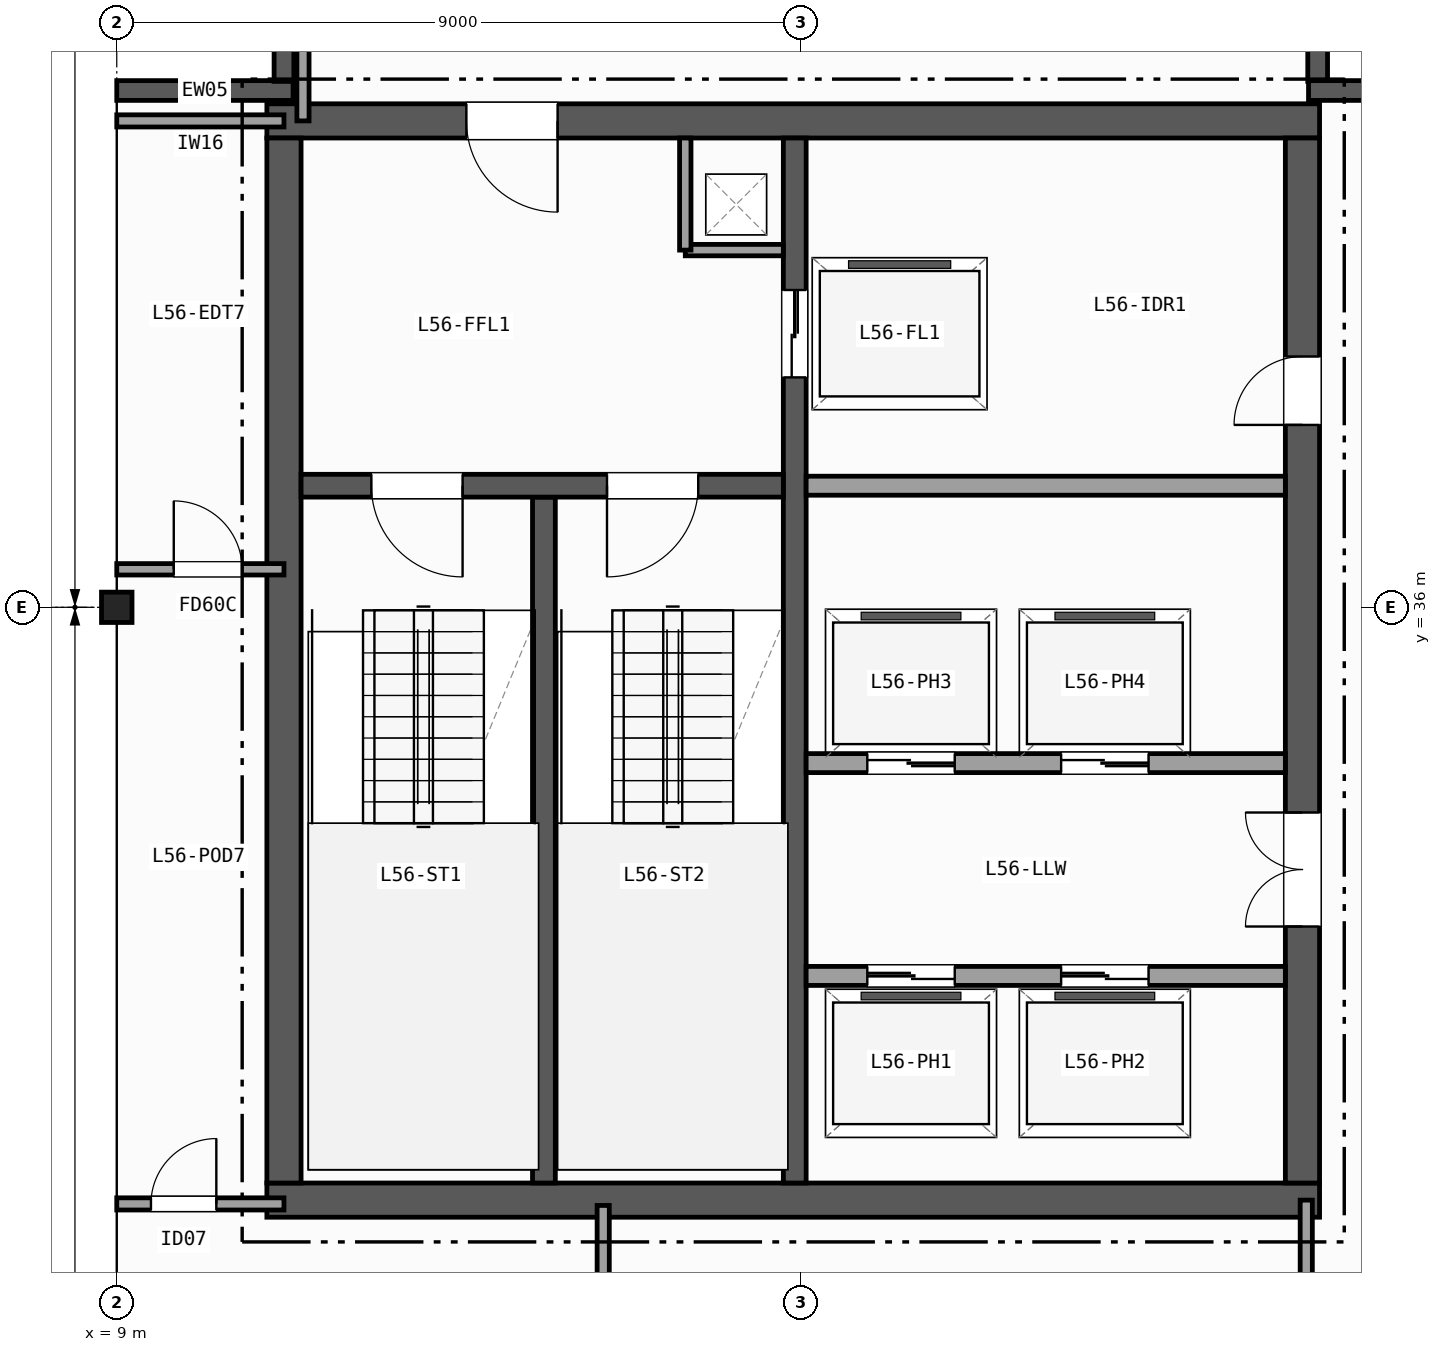
"""IFC4 building model, lengths in metres.
Left out: names, types, materials, properties, quantities, classifications, styles, units other than length and angle.
Written with IfcOpenShell. Run it as: python <this file> out.ifc"""

import sys

from ifc_helpers import new_model, si_unit, direction, frame, frame_2d, origin, origin_2d, place, context, subcontext, project, spatial, rectangle, i_section, extrude, element, fill, save


model = new_model("IFC4")
c1 = context("Model", 3, precision=1e-05, world=origin(), true_north=direction((0.0, 1.0)))
c2 = subcontext(c1, "Body", "Model", "MODEL_VIEW")
j1 = project(units=[si_unit("LENGTHUNIT", "METRE"), si_unit("PLANEANGLEUNIT", "RADIAN")], contexts=[c1])
p1 = place(None, origin())
s1 = spatial("IfcSite", under=j1, at=p1, CompositionType="ELEMENT")
p2 = place(p1, origin())
s2 = spatial("IfcBuilding", under=s1, at=p2, CompositionType="ELEMENT")
p3 = place(p2, frame((0.0, 0.0, 224.7)))
s3 = spatial("IfcBuildingStorey", under=s2, at=p3, CompositionType="ELEMENT", Elevation=224.7)
p4 = place(p3, frame((9.0, 36.0, 0.0), z_axis=(0.0, 0.0, 1.0), x_axis=(1.0, 0.0, 0.0)))
e1 = element("IfcColumn", 1, at=p4, inside=s3, PredefinedType="COLUMN", context=c2, shape_type="SweptSolid", body=[
    extrude(i_section(OverallWidth=0.401, OverallDepth=0.399, WebThickness=0.025, FlangeThickness=0.04, FilletRadius=0.015, at=origin_2d()), origin(), (0.0, 0.0, 1.0), 3.7),
])
p5 = place(p3, frame((9.0, 42.8, 0.0), z_axis=(0.0, 0.0, 1.0), x_axis=(1.0, 0.0, 0.0)))
e2 = element("IfcWall", 2, at=p5, inside=s3, PredefinedType="SOLIDWALL", context=c2, shape_type="SweptSolid", body=[
    extrude(rectangle(XDim=2.32, YDim=0.26, at=frame_2d((1.16, 0.0))), origin(), (0.0, 0.0, 1.0), 3.42),
])
for number, where, z_axis, x_axis in (
    (3, (11.2, 42.92, 0.0), (0.0, 0.0, 1.0), (0.0, 1.0, 0.0)),
    (4, (24.8, 45.0, 0.0), (0.0, 0.0, 1.0), (0.0, -1.0, 0.0)),
):
    element("IfcWall", number, at=place(p3, frame(where, z_axis=z_axis, x_axis=x_axis)), inside=s3, PredefinedType="SOLIDWALL", context=c2, shape_type="SweptSolid", body=[
        extrude(rectangle(XDim=2.08, YDim=0.26, at=frame_2d((1.04, 0.0))), origin(), (0.0, 0.0, 1.0), 3.42),
    ])
p6 = place(p3, frame((24.68, 42.8, 0.0), z_axis=(0.0, 0.0, 1.0), x_axis=(1.0, 0.0, 0.0)))
e5 = element("IfcWall", 5, at=p6, inside=s3, PredefinedType="SOLIDWALL", context=c2, shape_type="SweptSolid", body=[
    extrude(rectangle(XDim=2.32, YDim=0.26, at=frame_2d((1.16, 0.0))), origin(), (0.0, 0.0, 1.0), 3.42),
])
p7 = place(p3, frame((10.975, 28.2, 0.0), z_axis=(0.0, 0.0, 1.0), x_axis=(1.0, 0.0, 0.0)))
e6 = element("IfcWall", 6, at=p7, inside=s3, PredefinedType="SHEAR", context=c2, shape_type="SweptSolid", body=[
    extrude(rectangle(XDim=13.85, YDim=0.45, at=frame_2d((6.925, 0.0))), origin(), (0.0, 0.0, 1.0), 3.42),
])
p8 = place(p3, frame((24.825, 42.4, 0.0), z_axis=(0.0, 0.0, 1.0), x_axis=(-1.0, 0.0, 0.0)))
e7 = element("IfcWall", 7, at=p8, inside=s3, PredefinedType="SHEAR", context=c2, shape_type="SweptSolid", body=[
    extrude(rectangle(XDim=13.85, YDim=0.45, at=frame_2d((6.925, 0.0))), origin(), (0.0, 0.0, 1.0), 3.42),
])
p9 = place(p8, frame((10.025, 0.0, 0.0)))
e8 = element("IfcOpeningElement", 8, at=p9, cuts=e7, PredefinedType="OPENING", context=c2, shape_type="SweptSolid", body=[
    extrude(rectangle(XDim=1.2, YDim=2.15, at=frame_2d((0.6, 1.075))), frame((0.0, 0.235, 0.0), z_axis=(0.0, -1.0, 0.0), x_axis=(1.0, 0.0, 0.0)), (0.0, 0.0, 1.0), 0.47),
])
p10 = place(p3, frame((11.2, 42.175, 0.0), z_axis=(0.0, 0.0, 1.0), x_axis=(0.0, -1.0, 0.0)))
e9 = element("IfcWall", 9, at=p10, inside=s3, PredefinedType="SHEAR", context=c2, shape_type="SweptSolid", body=[
    extrude(rectangle(XDim=13.75, YDim=0.45, at=frame_2d((6.875, 0.0))), origin(), (0.0, 0.0, 1.0), 3.42),
])
p11 = place(p3, frame((24.6, 28.425, 0.0), z_axis=(0.0, 0.0, 1.0), x_axis=(0.0, 1.0, 0.0)))
e10 = element("IfcWall", 10, at=p11, inside=s3, PredefinedType="SHEAR", context=c2, shape_type="SweptSolid", body=[
    extrude(rectangle(XDim=13.75, YDim=0.45, at=frame_2d((6.875, 0.0))), origin(), (0.0, 0.0, 1.0), 3.42),
])
p12 = place(p11, frame((3.375, 0.0, 0.0)))
e11 = element("IfcOpeningElement", 11, at=p12, cuts=e10, PredefinedType="OPENING", context=c2, shape_type="SweptSolid", body=[
    extrude(rectangle(XDim=1.5, YDim=2.2, at=frame_2d((0.75, 1.1))), frame((0.0, 0.235, 0.0), z_axis=(0.0, -1.0, 0.0), x_axis=(1.0, 0.0, 0.0)), (0.0, 0.0, 1.0), 0.47),
])
p13 = place(p11, frame((9.975, 0.0, 0.0)))
e12 = element("IfcOpeningElement", 12, at=p13, cuts=e10, PredefinedType="OPENING", context=c2, shape_type="SweptSolid", body=[
    extrude(rectangle(XDim=0.9, YDim=2.1, at=frame_2d((0.45, 1.05))), frame((0.0, 0.235, 0.0), z_axis=(0.0, -1.0, 0.0), x_axis=(1.0, 0.0, 0.0)), (0.0, 0.0, 1.0), 0.47),
])
p14 = place(p3, frame((14.62, 28.425, 0.0), z_axis=(0.0, 0.0, 1.0), x_axis=(0.0, 1.0, 0.0)))
e13 = element("IfcWall", 13, at=p14, inside=s3, PredefinedType="SHEAR", context=c2, shape_type="SweptSolid", body=[
    extrude(rectangle(XDim=9.025, YDim=0.3, at=frame_2d((4.512, 0.0))), origin(), (0.0, 0.0, 1.0), 3.42),
])
p15 = place(p3, frame((17.92, 42.175, 0.0), z_axis=(0.0, 0.0, 1.0), x_axis=(0.0, -1.0, 0.0)))
e14 = element("IfcWall", 14, at=p15, inside=s3, PredefinedType="SHEAR", context=c2, shape_type="SweptSolid", body=[
    extrude(rectangle(XDim=13.75, YDim=0.3, at=frame_2d((6.875, 0.0))), origin(), (0.0, 0.0, 1.0), 3.42),
])
p16 = place(p15, frame((2.0, 0.0, 0.0)))
e15 = element("IfcOpeningElement", 15, at=p16, cuts=e14, PredefinedType="OPENING", context=c2, shape_type="SweptSolid", body=[
    extrude(rectangle(XDim=1.15, YDim=2.15, at=frame_2d((0.575, 1.075))), frame((0.0, 0.16, 0.0), z_axis=(0.0, -1.0, 0.0), x_axis=(1.0, 0.0, 0.0)), (0.0, 0.0, 1.0), 0.32),
])
p17 = place(p3, frame((17.77, 37.6, 0.0), z_axis=(0.0, 0.0, 1.0), x_axis=(-1.0, 0.0, 0.0)))
e16 = element("IfcWall", 16, at=p17, inside=s3, PredefinedType="SHEAR", context=c2, shape_type="SweptSolid", body=[
    extrude(rectangle(XDim=6.345, YDim=0.3, at=frame_2d((3.172, 0.0))), origin(), (0.0, 0.0, 1.0), 3.42),
])
p18 = place(p17, frame((4.22, 0.0, 0.0)))
e17 = element("IfcOpeningElement", 17, at=p18, cuts=e16, PredefinedType="OPENING", context=c2, shape_type="SweptSolid", body=[
    extrude(rectangle(XDim=1.2, YDim=2.15, at=frame_2d((0.6, 1.075))), frame((0.0, 0.16, 0.0), z_axis=(0.0, -1.0, 0.0), x_axis=(1.0, 0.0, 0.0)), (0.0, 0.0, 1.0), 0.32),
])
p19 = place(p17, frame((1.12, 0.0, 0.0)))
e18 = element("IfcOpeningElement", 18, at=p19, cuts=e16, PredefinedType="OPENING", context=c2, shape_type="SweptSolid", body=[
    extrude(rectangle(XDim=1.2, YDim=2.15, at=frame_2d((0.6, 1.075))), frame((0.0, 0.16, 0.0), z_axis=(0.0, -1.0, 0.0), x_axis=(1.0, 0.0, 0.0)), (0.0, 0.0, 1.0), 0.32),
])
p20 = place(p3, frame((16.48, 40.7, 0.0), z_axis=(0.0, 0.0, 1.0), x_axis=(1.0, 0.0, 0.0)))
e19 = element("IfcWall", 19, at=p20, inside=s3, PredefinedType="PARTITIONING", context=c2, shape_type="SweptSolid", body=[
    extrude(rectangle(XDim=1.29, YDim=0.15, at=frame_2d((0.645, 0.0))), origin(), (0.0, 0.0, 1.0), 3.42),
])
p21 = place(p3, frame((16.48, 40.7, 0.0), z_axis=(0.0, 0.0, 1.0), x_axis=(0.0, 1.0, 0.0)))
e20 = element("IfcWall", 20, at=p21, inside=s3, PredefinedType="PARTITIONING", context=c2, shape_type="SweptSolid", body=[
    extrude(rectangle(XDim=1.475, YDim=0.15, at=frame_2d((0.738, 0.0))), origin(), (0.0, 0.0, 1.0), 3.42),
])
p22 = place(p3, frame((18.07, 37.6, 0.0), z_axis=(0.0, 0.0, 1.0), x_axis=(1.0, 0.0, 0.0)))
e21 = element("IfcWall", 21, at=p22, inside=s3, PredefinedType="PARTITIONING", context=c2, shape_type="SweptSolid", body=[
    extrude(rectangle(XDim=6.305, YDim=0.25, at=frame_2d((3.152, 0.0))), origin(), (0.0, 0.0, 1.0), 3.42),
])
p23 = place(p3, frame((18.07, 31.15, 0.0), z_axis=(0.0, 0.0, 1.0), x_axis=(1.0, 0.0, 0.0)))
e22 = element("IfcWall", 22, at=p23, inside=s3, PredefinedType="PARTITIONING", context=c2, shape_type="SweptSolid", body=[
    extrude(rectangle(XDim=6.305, YDim=0.25, at=frame_2d((3.152, 0.0))), origin(), (0.0, 0.0, 1.0), 3.42),
])
p24 = place(p23, frame((0.805, 0.0, 0.0)))
e23 = element("IfcOpeningElement", 23, at=p24, cuts=e22, PredefinedType="OPENING", context=c2, shape_type="SweptSolid", body=[
    extrude(rectangle(XDim=1.15, YDim=2.15, at=frame_2d((0.575, 1.075))), frame((0.0, 0.135, 0.0), z_axis=(0.0, -1.0, 0.0), x_axis=(1.0, 0.0, 0.0)), (0.0, 0.0, 1.0), 0.27),
])
p25 = place(p23, frame((3.355, 0.0, 0.0)))
e24 = element("IfcOpeningElement", 24, at=p25, cuts=e22, PredefinedType="OPENING", context=c2, shape_type="SweptSolid", body=[
    extrude(rectangle(XDim=1.15, YDim=2.15, at=frame_2d((0.575, 1.075))), frame((0.0, 0.135, 0.0), z_axis=(0.0, -1.0, 0.0), x_axis=(1.0, 0.0, 0.0)), (0.0, 0.0, 1.0), 0.27),
])
p26 = place(p3, frame((24.375, 33.95, 0.0), z_axis=(0.0, 0.0, 1.0), x_axis=(-1.0, 0.0, 0.0)))
e25 = element("IfcWall", 25, at=p26, inside=s3, PredefinedType="PARTITIONING", context=c2, shape_type="SweptSolid", body=[
    extrude(rectangle(XDim=6.305, YDim=0.25, at=frame_2d((3.152, 0.0))), origin(), (0.0, 0.0, 1.0), 3.42),
])
p27 = place(p26, frame((4.35, 0.0, 0.0)))
e26 = element("IfcOpeningElement", 26, at=p27, cuts=e25, PredefinedType="OPENING", context=c2, shape_type="SweptSolid", body=[
    extrude(rectangle(XDim=1.15, YDim=2.15, at=frame_2d((0.575, 1.075))), frame((0.0, 0.135, 0.0), z_axis=(0.0, -1.0, 0.0), x_axis=(1.0, 0.0, 0.0)), (0.0, 0.0, 1.0), 0.27),
])
p28 = place(p26, frame((1.8, 0.0, 0.0)))
e27 = element("IfcOpeningElement", 27, at=p28, cuts=e25, PredefinedType="OPENING", context=c2, shape_type="SweptSolid", body=[
    extrude(rectangle(XDim=1.15, YDim=2.15, at=frame_2d((0.575, 1.075))), frame((0.0, 0.135, 0.0), z_axis=(0.0, -1.0, 0.0), x_axis=(1.0, 0.0, 0.0)), (0.0, 0.0, 1.0), 0.27),
])
p29 = place(p3, frame((9.0, 28.15, 0.0), z_axis=(0.0, 0.0, 1.0), x_axis=(1.0, 0.0, 0.0)))
e28 = element("IfcWall", 28, at=p29, inside=s3, PredefinedType="PARTITIONING", context=c2, shape_type="SweptSolid", body=[
    extrude(rectangle(XDim=2.2, YDim=0.16, at=frame_2d((1.1, 0.0))), origin(), (0.0, 0.0, 1.0), 2.707),
])
p30 = place(p29, frame((0.45, 0.0, 0.0)))
e29 = element("IfcOpeningElement", 29, at=p30, cuts=e28, PredefinedType="OPENING", context=c2, shape_type="SweptSolid", body=[
    extrude(rectangle(XDim=0.86, YDim=2.05, at=frame_2d((0.43, 1.025))), frame((0.0, 0.09, 0.0), z_axis=(0.0, -1.0, 0.0), x_axis=(1.0, 0.0, 0.0)), (0.0, 0.0, 1.0), 0.18),
])
p31 = place(p3, frame((9.0, 42.4, 0.0), z_axis=(0.0, 0.0, 1.0), x_axis=(1.0, 0.0, 0.0)))
e30 = element("IfcWall", 30, at=p31, inside=s3, PredefinedType="PARTITIONING", context=c2, shape_type="SweptSolid", body=[
    extrude(rectangle(XDim=2.2, YDim=0.16, at=frame_2d((1.1, 0.0))), origin(), (0.0, 0.0, 1.0), 3.42),
])
p32 = place(p3, frame((11.45, 42.4, 0.0), z_axis=(0.0, 0.0, 1.0), x_axis=(0.0, 1.0, 0.0)))
e31 = element("IfcWall", 31, at=p32, inside=s3, PredefinedType="PARTITIONING", context=c2, shape_type="SweptSolid", body=[
    extrude(rectangle(XDim=2.666, YDim=0.16, at=frame_2d((1.333, 0.0))), origin(), (0.0, 0.0, 1.0), 3.42),
])
p33 = place(p3, frame((9.0, 36.5, 0.0), z_axis=(0.0, 0.0, 1.0), x_axis=(1.0, 0.0, 0.0)))
e32 = element("IfcWall", 32, at=p33, inside=s3, PredefinedType="PARTITIONING", context=c2, shape_type="SweptSolid", body=[
    extrude(rectangle(XDim=2.2, YDim=0.15, at=frame_2d((1.1, 0.0))), origin(), (0.0, 0.0, 1.0), 3.42),
])
p34 = place(p33, frame((0.75, 0.0, 0.0)))
e33 = element("IfcOpeningElement", 33, at=p34, cuts=e32, PredefinedType="OPENING", context=c2, shape_type="SweptSolid", body=[
    extrude(rectangle(XDim=0.9, YDim=2.1, at=frame_2d((0.45, 1.05))), frame((0.0, 0.085, 0.0), z_axis=(0.0, -1.0, 0.0), x_axis=(1.0, 0.0, 0.0)), (0.0, 0.0, 1.0), 0.17),
])
p35 = place(p3, frame((24.65, 9.0, 0.0), z_axis=(0.0, 0.0, 1.0), x_axis=(0.0, 1.0, 0.0)))
e34 = element("IfcWall", 34, at=p35, inside=s3, PredefinedType="PARTITIONING", context=c2, shape_type="SweptSolid", body=[
    extrude(rectangle(XDim=19.2, YDim=0.16, at=frame_2d((9.6, 0.0))), origin(), (0.0, 0.0, 1.0), 2.707),
])
p36 = place(p35, frame((12.2, 0.0, 0.0)))
e35 = element("IfcOpeningElement", 35, at=p36, cuts=e34, PredefinedType="OPENING", context=c2, shape_type="SweptSolid", body=[
    extrude(rectangle(XDim=1.0, YDim=2.1, at=frame_2d((0.5, 1.05))), frame((0.0, 0.09, 0.0), z_axis=(0.0, -1.0, 0.0), x_axis=(1.0, 0.0, 0.0)), (0.0, 0.0, 1.0), 0.18),
])
p37 = place(p35, frame((4.2, 0.0, 0.0)))
e36 = element("IfcOpeningElement", 36, at=p37, cuts=e34, PredefinedType="OPENING", context=c2, shape_type="SweptSolid", body=[
    extrude(rectangle(XDim=1.05, YDim=2.15, at=frame_2d((0.525, 1.075))), frame((0.0, 0.09, 0.0), z_axis=(0.0, -1.0, 0.0), x_axis=(1.0, 0.0, 0.0)), (0.0, 0.0, 1.0), 0.18),
])
p38 = place(p3, frame((15.4, 18.0, 0.0), z_axis=(0.0, 0.0, 1.0), x_axis=(0.0, 1.0, 0.0)))
e37 = element("IfcWall", 37, at=p38, inside=s3, PredefinedType="PARTITIONING", context=c2, shape_type="SweptSolid", body=[
    extrude(rectangle(XDim=10.13, YDim=0.16, at=frame_2d((5.065, 0.0))), origin(), (0.0, 0.0, 1.0), 2.789),
])
p39 = place(p38, frame((2.5, 0.0, 0.0)))
e38 = element("IfcOpeningElement", 38, at=p39, cuts=e37, PredefinedType="OPENING", context=c2, shape_type="SweptSolid", body=[
    extrude(rectangle(XDim=1.2, YDim=2.15, at=frame_2d((0.6, 1.075))), frame((0.0, 0.09, 0.0), z_axis=(0.0, -1.0, 0.0), x_axis=(1.0, 0.0, 0.0)), (0.0, 0.0, 1.0), 0.18),
])
p40 = place(p18, origin())
e39 = element("IfcDoor", 39, at=p40, inside=s3, OperationType="SINGLE_SWING_LEFT", PredefinedType="DOOR", context=c2, shape_type="SweptSolid", body=[
    extrude(rectangle(XDim=1.2, YDim=2.15, at=frame_2d((0.6, 1.075))), frame((0.0, 0.025, 0.0), z_axis=(0.0, -1.0, 0.0), x_axis=(1.0, 0.0, 0.0)), (0.0, 0.0, 1.0), 0.05),
])
fill(e17, e39)
p41 = place(p19, origin())
e40 = element("IfcDoor", 40, at=p41, inside=s3, OperationType="SINGLE_SWING_RIGHT", PredefinedType="DOOR", context=c2, shape_type="SweptSolid", body=[
    extrude(rectangle(XDim=1.2, YDim=2.15, at=frame_2d((0.6, 1.075))), frame((0.0, 0.025, 0.0), z_axis=(0.0, -1.0, 0.0), x_axis=(1.0, 0.0, 0.0)), (0.0, 0.0, 1.0), 0.05),
])
fill(e18, e40)
p42 = place(p12, origin())
e41 = element("IfcDoor", 41, at=p42, inside=s3, OperationType="DOUBLE_DOOR_SINGLE_SWING", PredefinedType="DOOR", context=c2, shape_type="SweptSolid", body=[
    extrude(rectangle(XDim=1.5, YDim=2.2, at=frame_2d((0.75, 1.1))), frame((0.0, 0.025, 0.0), z_axis=(0.0, -1.0, 0.0), x_axis=(1.0, 0.0, 0.0)), (0.0, 0.0, 1.0), 0.05),
])
fill(e11, e41)
p43 = place(p9, origin())
e42 = element("IfcDoor", 42, at=p43, inside=s3, OperationType="SINGLE_SWING_LEFT", PredefinedType="DOOR", context=c2, shape_type="SweptSolid", body=[
    extrude(rectangle(XDim=1.2, YDim=2.15, at=frame_2d((0.6, 1.075))), frame((0.0, 0.025, 0.0), z_axis=(0.0, -1.0, 0.0), x_axis=(1.0, 0.0, 0.0)), (0.0, 0.0, 1.0), 0.05),
])
fill(e8, e42)
p44 = place(p13, origin())
e43 = element("IfcDoor", 43, at=p44, inside=s3, OperationType="SINGLE_SWING_LEFT", PredefinedType="DOOR", context=c2, shape_type="SweptSolid", body=[
    extrude(rectangle(XDim=0.9, YDim=2.1, at=frame_2d((0.45, 1.05))), frame((0.0, 0.025, 0.0), z_axis=(0.0, -1.0, 0.0), x_axis=(1.0, 0.0, 0.0)), (0.0, 0.0, 1.0), 0.05),
])
fill(e12, e43)
p45 = place(p16, origin())
e44 = element("IfcDoor", 44, at=p45, inside=s3, OperationType="DOUBLE_DOOR_SLIDING", PredefinedType="DOOR", context=c2, shape_type="SweptSolid", body=[
    extrude(rectangle(XDim=1.15, YDim=2.15, at=frame_2d((0.575, 1.075))), frame((0.0, 0.025, 0.0), z_axis=(0.0, -1.0, 0.0), x_axis=(1.0, 0.0, 0.0)), (0.0, 0.0, 1.0), 0.05),
])
fill(e15, e44)
p46 = place(p24, origin())
e45 = element("IfcDoor", 45, at=p46, inside=s3, OperationType="DOUBLE_DOOR_SLIDING", PredefinedType="DOOR", context=c2, shape_type="SweptSolid", body=[
    extrude(rectangle(XDim=1.15, YDim=2.15, at=frame_2d((0.575, 1.075))), frame((0.0, 0.025, 0.0), z_axis=(0.0, -1.0, 0.0), x_axis=(1.0, 0.0, 0.0)), (0.0, 0.0, 1.0), 0.05),
])
fill(e23, e45)
p47 = place(p25, origin())
e46 = element("IfcDoor", 46, at=p47, inside=s3, OperationType="DOUBLE_DOOR_SLIDING", PredefinedType="DOOR", context=c2, shape_type="SweptSolid", body=[
    extrude(rectangle(XDim=1.15, YDim=2.15, at=frame_2d((0.575, 1.075))), frame((0.0, 0.025, 0.0), z_axis=(0.0, -1.0, 0.0), x_axis=(1.0, 0.0, 0.0)), (0.0, 0.0, 1.0), 0.05),
])
fill(e24, e46)
p48 = place(p27, origin())
e47 = element("IfcDoor", 47, at=p48, inside=s3, OperationType="DOUBLE_DOOR_SLIDING", PredefinedType="DOOR", context=c2, shape_type="SweptSolid", body=[
    extrude(rectangle(XDim=1.15, YDim=2.15, at=frame_2d((0.575, 1.075))), frame((0.0, 0.025, 0.0), z_axis=(0.0, -1.0, 0.0), x_axis=(1.0, 0.0, 0.0)), (0.0, 0.0, 1.0), 0.05),
])
fill(e26, e47)
p49 = place(p28, origin())
e48 = element("IfcDoor", 48, at=p49, inside=s3, OperationType="DOUBLE_DOOR_SLIDING", PredefinedType="DOOR", context=c2, shape_type="SweptSolid", body=[
    extrude(rectangle(XDim=1.15, YDim=2.15, at=frame_2d((0.575, 1.075))), frame((0.0, 0.025, 0.0), z_axis=(0.0, -1.0, 0.0), x_axis=(1.0, 0.0, 0.0)), (0.0, 0.0, 1.0), 0.05),
])
fill(e27, e48)
p50 = place(p30, origin())
e49 = element("IfcDoor", 49, at=p50, inside=s3, OperationType="SINGLE_SWING_RIGHT", PredefinedType="DOOR", context=c2, shape_type="SweptSolid", body=[
    extrude(rectangle(XDim=0.86, YDim=2.05, at=frame_2d((0.43, 1.025))), frame((0.0, 0.025, 0.0), z_axis=(0.0, -1.0, 0.0), x_axis=(1.0, 0.0, 0.0)), (0.0, 0.0, 1.0), 0.05),
])
fill(e29, e49)
p51 = place(p34, origin())
e50 = element("IfcDoor", 50, at=p51, inside=s3, OperationType="SINGLE_SWING_LEFT", PredefinedType="DOOR", context=c2, shape_type="SweptSolid", body=[
    extrude(rectangle(XDim=0.9, YDim=2.1, at=frame_2d((0.45, 1.05))), frame((0.0, 0.025, 0.0), z_axis=(0.0, -1.0, 0.0), x_axis=(1.0, 0.0, 0.0)), (0.0, 0.0, 1.0), 0.05),
])
fill(e33, e50)
save(model, sys.argv[1])
